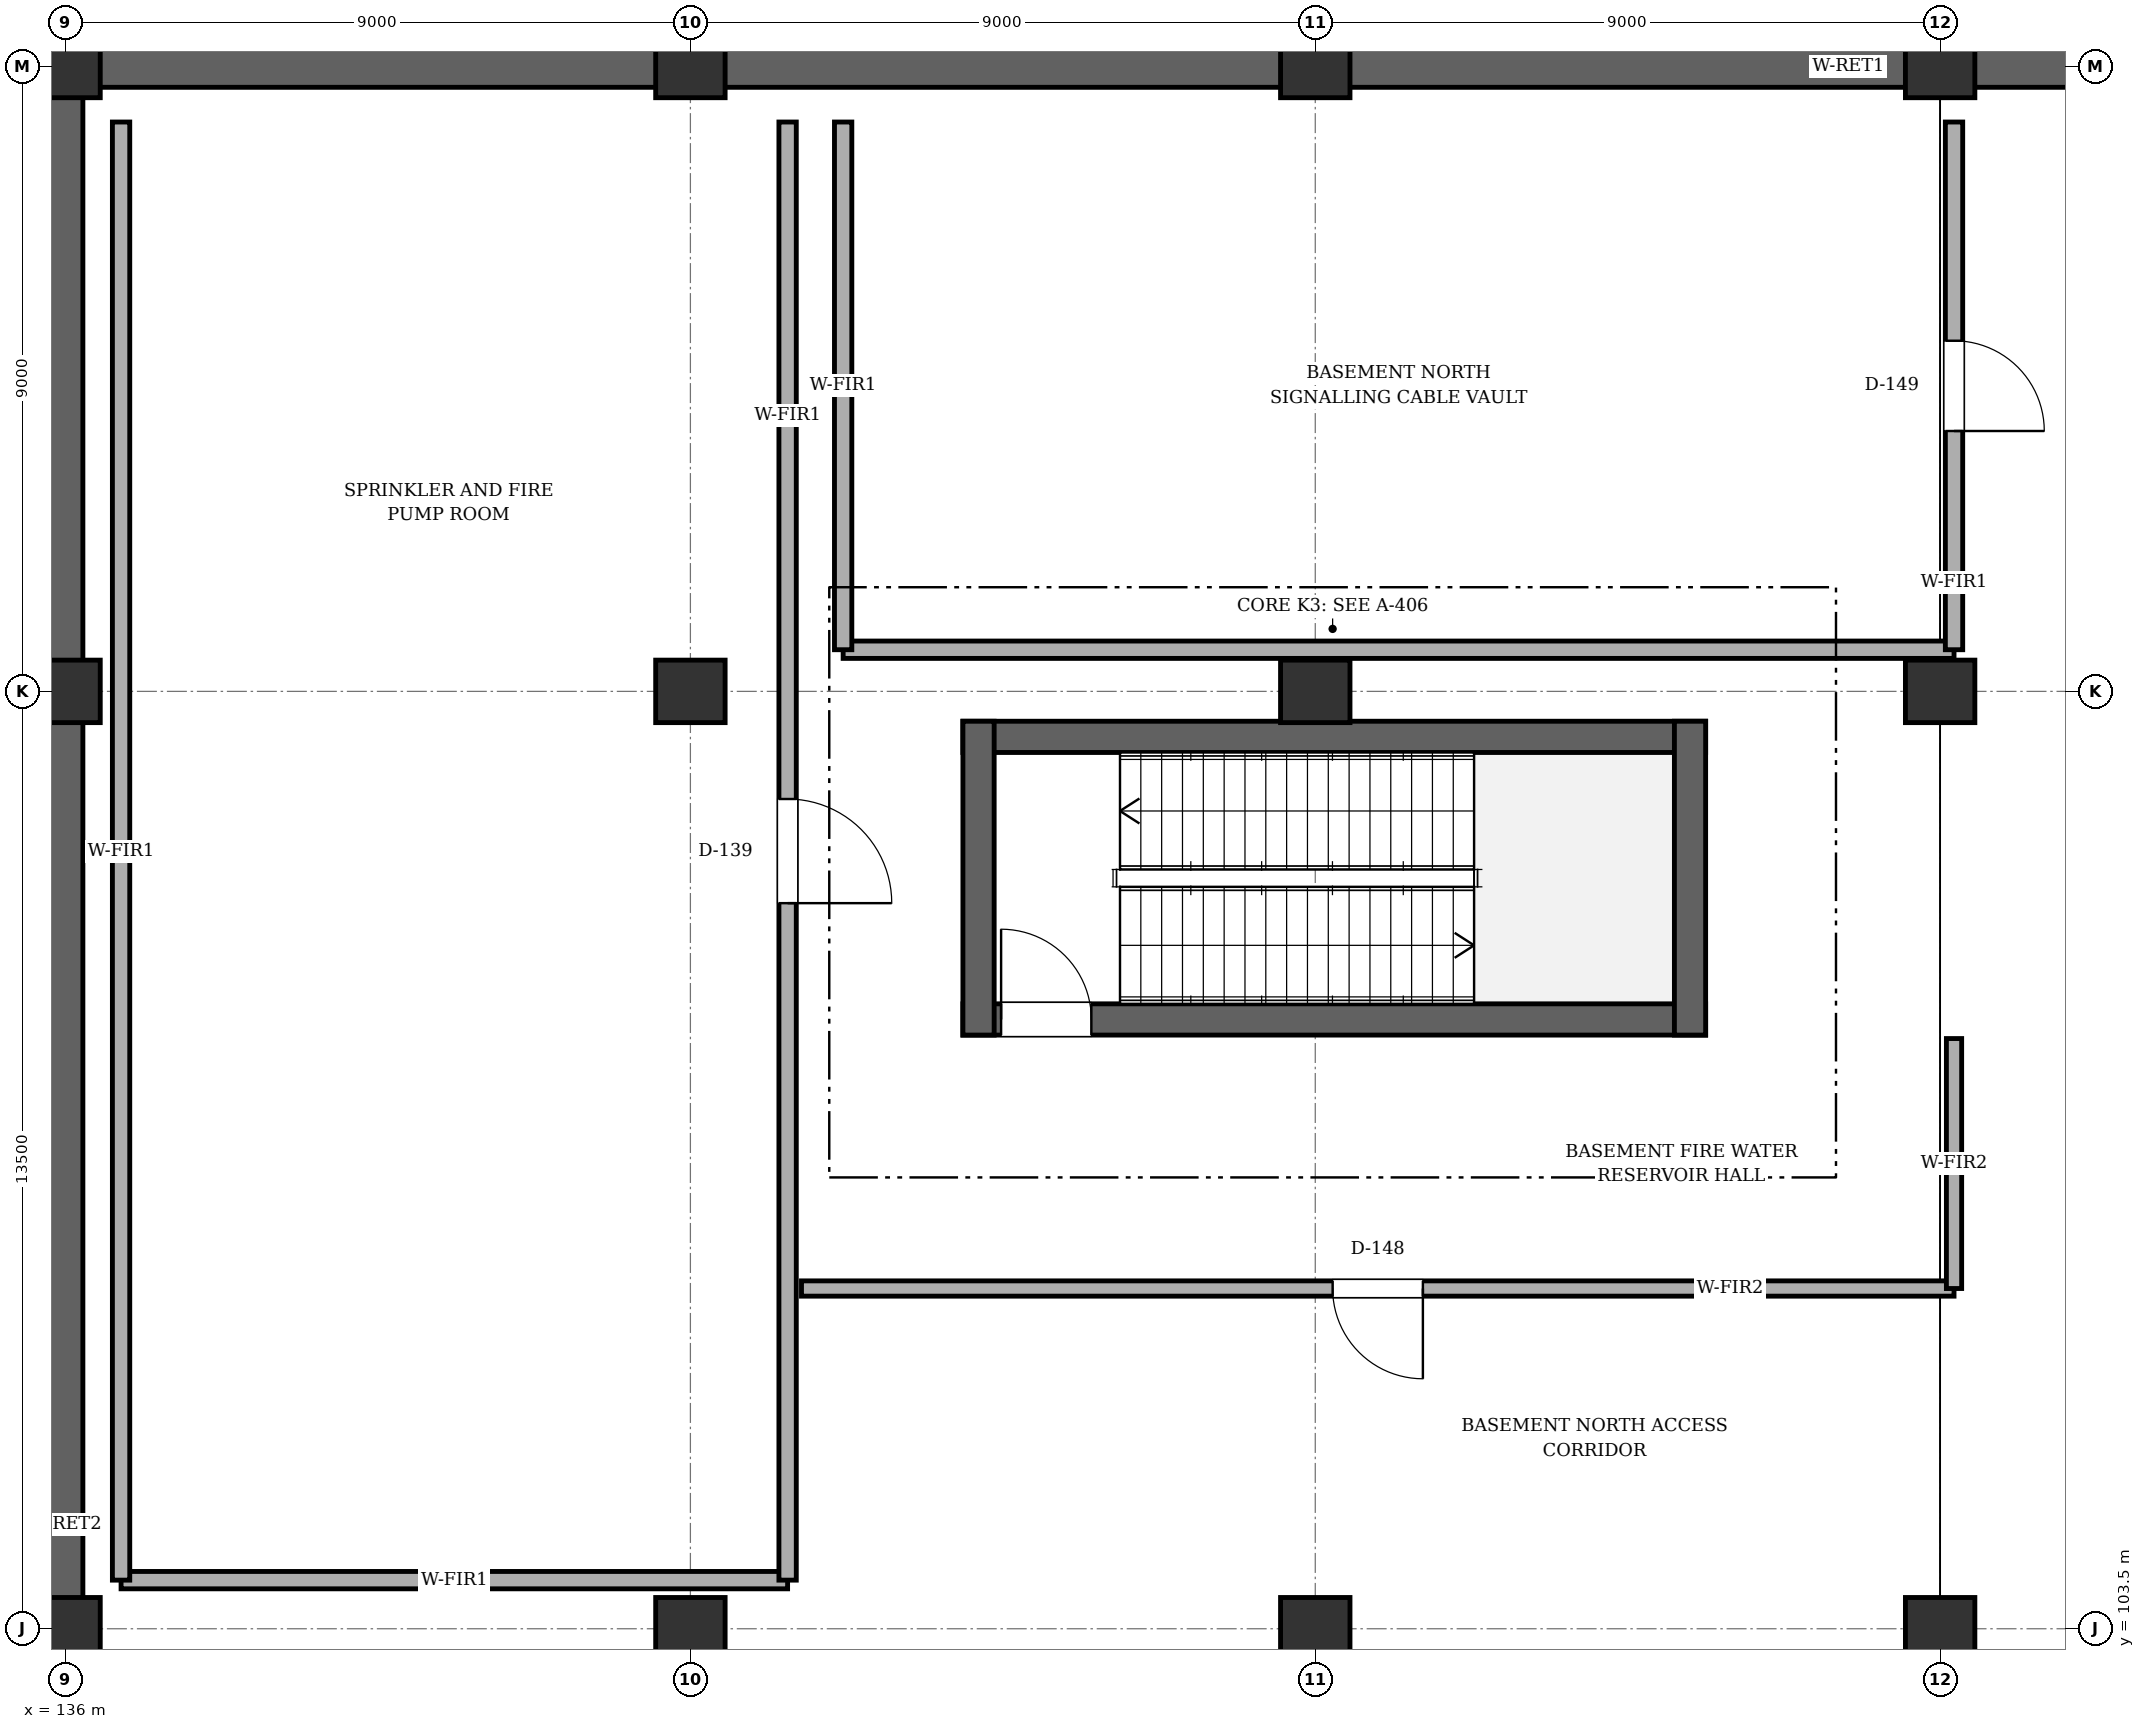
"""IFC4 building model, lengths in metres.
Left out: names, types, materials, properties, quantities, classifications, styles, units other than length and angle.
Written with IfcOpenShell. Run it as: python <this file> out.ifc"""

import sys

from ifc_helpers import new_model, si_unit, direction, frame, frame_2d, origin, origin_2d, place, context, subcontext, project, spatial, rectangle, extrude, element, fill, save


model = new_model("IFC4")
c1 = context("Model", 3, precision=1e-05, world=origin(), true_north=direction((0.0, 1.0)))
c2 = subcontext(c1, "Body", "Model", "MODEL_VIEW")
j1 = project(units=[si_unit("LENGTHUNIT", "METRE"), si_unit("PLANEANGLEUNIT", "RADIAN")], contexts=[c1])
p1 = place(None, origin())
s1 = spatial("IfcSite", under=j1, at=p1, CompositionType="ELEMENT")
p2 = place(p1, origin())
s2 = spatial("IfcBuilding", under=s1, at=p2, CompositionType="ELEMENT")
p3 = place(p2, frame((0.0, 0.0, -5.4)))
s3 = spatial("IfcBuildingStorey", under=s2, at=p3, CompositionType="ELEMENT", Elevation=-5.4)
for number, where, z_axis, x_axis in (
    (1, (136.0, 103.5, 0.0), (0.0, 0.0, 1.0), (1.0, 0.0, 0.0)),
    (2, (136.0, 117.0, 0.0), (0.0, 0.0, 1.0), (1.0, 0.0, 0.0)),
    (3, (136.0, 126.0, 0.0), (0.0, 0.0, 1.0), (1.0, 0.0, 0.0)),
    (4, (145.0, 103.5, 0.0), (0.0, 0.0, 1.0), (1.0, 0.0, 0.0)),
    (5, (145.0, 117.0, 0.0), (0.0, 0.0, 1.0), (1.0, 0.0, 0.0)),
    (6, (145.0, 126.0, 0.0), (0.0, 0.0, 1.0), (1.0, 0.0, 0.0)),
    (7, (154.0, 103.5, 0.0), (0.0, 0.0, 1.0), (1.0, 0.0, 0.0)),
    (8, (154.0, 117.0, 0.0), (0.0, 0.0, 1.0), (1.0, 0.0, 0.0)),
    (9, (154.0, 126.0, 0.0), (0.0, 0.0, 1.0), (1.0, 0.0, 0.0)),
    (10, (163.0, 103.5, 0.0), (0.0, 0.0, 1.0), (1.0, 0.0, 0.0)),
    (11, (163.0, 117.0, 0.0), (0.0, 0.0, 1.0), (1.0, 0.0, 0.0)),
    (12, (163.0, 126.0, 0.0), (0.0, 0.0, 1.0), (1.0, 0.0, 0.0)),
):
    element("IfcColumn", number, at=place(p3, frame(where, z_axis=z_axis, x_axis=x_axis)), inside=s3, PredefinedType="COLUMN", context=c2, shape_type="SweptSolid", body=[
        extrude(rectangle(XDim=1.0, YDim=0.9, at=origin_2d()), origin(), (0.0, 0.0, 1.0), 5.4),
    ])
p4 = place(p3, frame((188.0, 126.0, 0.0), z_axis=(0.0, 0.0, 1.0), x_axis=(-1.0, 0.0, 0.0)))
e13 = element("IfcWall", 13, at=p4, inside=s3, PredefinedType="USERDEFINED", context=c2, shape_type="SweptSolid", body=[
    extrude(rectangle(XDim=52.0, YDim=0.6, at=frame_2d((26.0, 0.0))), origin(), (0.0, 0.0, 1.0), 5.1),
])
p5 = place(p3, frame((136.0, 126.0, 0.0), z_axis=(0.0, 0.0, 1.0), x_axis=(0.0, -1.0, 0.0)))
e14 = element("IfcWall", 14, at=p5, inside=s3, PredefinedType="USERDEFINED", context=c2, shape_type="SweptSolid", body=[
    extrude(rectangle(XDim=72.0, YDim=0.5, at=frame_2d((36.0, 0.0))), origin(), (0.0, 0.0, 1.0), 5.1),
])
p6 = place(p3, frame((148.925, 112.275, 0.0), z_axis=(0.0, 0.0, 1.0), x_axis=(1.0, 0.0, 0.0)))
e15 = element("IfcWall", 15, at=p6, inside=s3, PredefinedType="SHEAR", context=c2, shape_type="SweptSolid", body=[
    extrude(rectangle(XDim=10.698, YDim=0.45, at=frame_2d((5.349, 0.0))), origin(), (0.0, 0.0, 1.0), 5.1),
])
p7 = place(p6, frame((0.55, 0.0, 0.0)))
e16 = element("IfcOpeningElement", 16, at=p7, cuts=e15, PredefinedType="OPENING", context=c2, shape_type="SweptSolid", body=[
    extrude(rectangle(XDim=1.3, YDim=2.1, at=frame_2d((0.65, 1.05))), frame((0.0, 0.235, 0.0), z_axis=(0.0, -1.0, 0.0), x_axis=(1.0, 0.0, 0.0)), (0.0, 0.0, 1.0), 0.47),
])
p8 = place(p3, frame((159.623, 116.345, 0.0), z_axis=(0.0, 0.0, 1.0), x_axis=(-1.0, 0.0, 0.0)))
e17 = element("IfcWall", 17, at=p8, inside=s3, PredefinedType="SHEAR", context=c2, shape_type="SweptSolid", body=[
    extrude(rectangle(XDim=10.698, YDim=0.45, at=frame_2d((5.349, 0.0))), origin(), (0.0, 0.0, 1.0), 5.1),
])
for number, where, z_axis, x_axis in (
    (18, (159.397, 112.05, 0.0), (0.0, 0.0, 1.0), (0.0, 1.0, 0.0)),
    (19, (149.15, 116.57, 0.0), (0.0, 0.0, 1.0), (0.0, -1.0, 0.0)),
):
    element("IfcWall", number, at=place(p3, frame(where, z_axis=z_axis, x_axis=x_axis)), inside=s3, PredefinedType="SHEAR", context=c2, shape_type="SweptSolid", body=[
        extrude(rectangle(XDim=4.52, YDim=0.45, at=frame_2d((2.26, 0.0))), origin(), (0.0, 0.0, 1.0), 5.1),
    ])
p9 = place(p3, frame((146.4, 104.2, 0.0), z_axis=(0.0, 0.0, 1.0), x_axis=(-1.0, 0.0, 0.0)))
e20 = element("IfcWall", 20, at=p9, inside=s3, PredefinedType="SOLIDWALL", context=c2, shape_type="SweptSolid", body=[
    extrude(rectangle(XDim=9.6, YDim=0.25, at=frame_2d((4.8, 0.0))), origin(), (0.0, 0.0, 1.0), 4.4),
])
p10 = place(p3, frame((136.8, 104.2, 0.0), z_axis=(0.0, 0.0, 1.0), x_axis=(0.0, 1.0, 0.0)))
e21 = element("IfcWall", 21, at=p10, inside=s3, PredefinedType="SOLIDWALL", context=c2, shape_type="SweptSolid", body=[
    extrude(rectangle(XDim=21.0, YDim=0.25, at=frame_2d((10.5, 0.0))), origin(), (0.0, 0.0, 1.0), 4.4),
])
p11 = place(p3, frame((146.4, 125.2, 0.0), z_axis=(0.0, 0.0, 1.0), x_axis=(0.0, -1.0, 0.0)))
e22 = element("IfcWall", 22, at=p11, inside=s3, PredefinedType="SOLIDWALL", context=c2, shape_type="SweptSolid", body=[
    extrude(rectangle(XDim=21.0, YDim=0.25, at=frame_2d((10.5, 0.0))), origin(), (0.0, 0.0, 1.0), 4.4),
])
p12 = place(p11, frame((9.75, 0.0, 0.0)))
e23 = element("IfcOpeningElement", 23, at=p12, cuts=e22, PredefinedType="OPENING", context=c2, shape_type="SweptSolid", body=[
    extrude(rectangle(XDim=1.5, YDim=2.15, at=frame_2d((0.75, 1.075))), frame((0.0, 0.135, 0.0), z_axis=(0.0, -1.0, 0.0), x_axis=(1.0, 0.0, 0.0)), (0.0, 0.0, 1.0), 0.27),
])
p13 = place(p3, frame((163.2, 108.4, 0.0), z_axis=(0.0, 0.0, 1.0), x_axis=(-1.0, 0.0, 0.0)))
e24 = element("IfcWall", 24, at=p13, inside=s3, PredefinedType="SOLIDWALL", context=c2, shape_type="SweptSolid", body=[
    extrude(rectangle(XDim=16.6, YDim=0.22, at=frame_2d((8.3, 0.0))), origin(), (0.0, 0.0, 1.0), 4.4),
])
p14 = place(p13, frame((7.65, 0.0, 0.0)))
e25 = element("IfcOpeningElement", 25, at=p14, cuts=e24, PredefinedType="OPENING", context=c2, shape_type="SweptSolid", body=[
    extrude(rectangle(XDim=1.3, YDim=2.1, at=frame_2d((0.65, 1.05))), frame((0.0, 0.12, 0.0), z_axis=(0.0, -1.0, 0.0), x_axis=(1.0, 0.0, 0.0)), (0.0, 0.0, 1.0), 0.24),
])
p15 = place(p3, frame((163.2, 112.0, 0.0), z_axis=(0.0, 0.0, 1.0), x_axis=(0.0, -1.0, 0.0)))
e26 = element("IfcWall", 26, at=p15, inside=s3, PredefinedType="SOLIDWALL", context=c2, shape_type="SweptSolid", body=[
    extrude(rectangle(XDim=3.6, YDim=0.22, at=frame_2d((1.8, 0.0))), origin(), (0.0, 0.0, 1.0), 4.4),
])
p16 = place(p3, frame((163.2, 117.6, 0.0), z_axis=(0.0, 0.0, 1.0), x_axis=(-1.0, 0.0, 0.0)))
e27 = element("IfcWall", 27, at=p16, inside=s3, PredefinedType="SOLIDWALL", context=c2, shape_type="SweptSolid", body=[
    extrude(rectangle(XDim=16.0, YDim=0.25, at=frame_2d((8.0, 0.0))), origin(), (0.0, 0.0, 1.0), 4.4),
])
p17 = place(p3, frame((147.2, 117.6, 0.0), z_axis=(0.0, 0.0, 1.0), x_axis=(0.0, 1.0, 0.0)))
e28 = element("IfcWall", 28, at=p17, inside=s3, PredefinedType="SOLIDWALL", context=c2, shape_type="SweptSolid", body=[
    extrude(rectangle(XDim=7.6, YDim=0.25, at=frame_2d((3.8, 0.0))), origin(), (0.0, 0.0, 1.0), 4.4),
])
p18 = place(p3, frame((163.2, 125.2, 0.0), z_axis=(0.0, 0.0, 1.0), x_axis=(0.0, -1.0, 0.0)))
e29 = element("IfcWall", 29, at=p18, inside=s3, PredefinedType="SOLIDWALL", context=c2, shape_type="SweptSolid", body=[
    extrude(rectangle(XDim=7.6, YDim=0.25, at=frame_2d((3.8, 0.0))), origin(), (0.0, 0.0, 1.0), 4.4),
])
p19 = place(p18, frame((3.15, 0.0, 0.0)))
e30 = element("IfcOpeningElement", 30, at=p19, cuts=e29, PredefinedType="OPENING", context=c2, shape_type="SweptSolid", body=[
    extrude(rectangle(XDim=1.3, YDim=2.1, at=frame_2d((0.65, 1.05))), frame((0.0, 0.135, 0.0), z_axis=(0.0, -1.0, 0.0), x_axis=(1.0, 0.0, 0.0)), (0.0, 0.0, 1.0), 0.27),
])
p20 = place(p7, origin())
e31 = element("IfcDoor", 31, at=p20, inside=s3, OperationType="SINGLE_SWING_LEFT", PredefinedType="DOOR", context=c2, shape_type="SweptSolid", body=[
    extrude(rectangle(XDim=1.3, YDim=2.1, at=frame_2d((0.65, 1.05))), frame((0.0, 0.025, 0.0), z_axis=(0.0, -1.0, 0.0), x_axis=(1.0, 0.0, 0.0)), (0.0, 0.0, 1.0), 0.05),
])
fill(e16, e31)
p21 = place(p12, origin())
e32 = element("IfcDoor", 32, at=p21, inside=s3, OperationType="SINGLE_SWING_RIGHT", PredefinedType="DOOR", context=c2, shape_type="SweptSolid", body=[
    extrude(rectangle(XDim=1.5, YDim=2.15, at=frame_2d((0.75, 1.075))), frame((0.0, 0.025, 0.0), z_axis=(0.0, -1.0, 0.0), x_axis=(1.0, 0.0, 0.0)), (0.0, 0.0, 1.0), 0.05),
])
fill(e23, e32)
p22 = place(p14, origin())
e33 = element("IfcDoor", 33, at=p22, inside=s3, OperationType="SINGLE_SWING_LEFT", PredefinedType="DOOR", context=c2, shape_type="SweptSolid", body=[
    extrude(rectangle(XDim=1.3, YDim=2.1, at=frame_2d((0.65, 1.05))), frame((0.0, 0.025, 0.0), z_axis=(0.0, -1.0, 0.0), x_axis=(1.0, 0.0, 0.0)), (0.0, 0.0, 1.0), 0.05),
])
fill(e25, e33)
p23 = place(p19, origin())
e34 = element("IfcDoor", 34, at=p23, inside=s3, OperationType="SINGLE_SWING_RIGHT", PredefinedType="DOOR", context=c2, shape_type="SweptSolid", body=[
    extrude(rectangle(XDim=1.3, YDim=2.1, at=frame_2d((0.65, 1.05))), frame((0.0, 0.025, 0.0), z_axis=(0.0, -1.0, 0.0), x_axis=(1.0, 0.0, 0.0)), (0.0, 0.0, 1.0), 0.05),
])
fill(e30, e34)
save(model, sys.argv[1])
